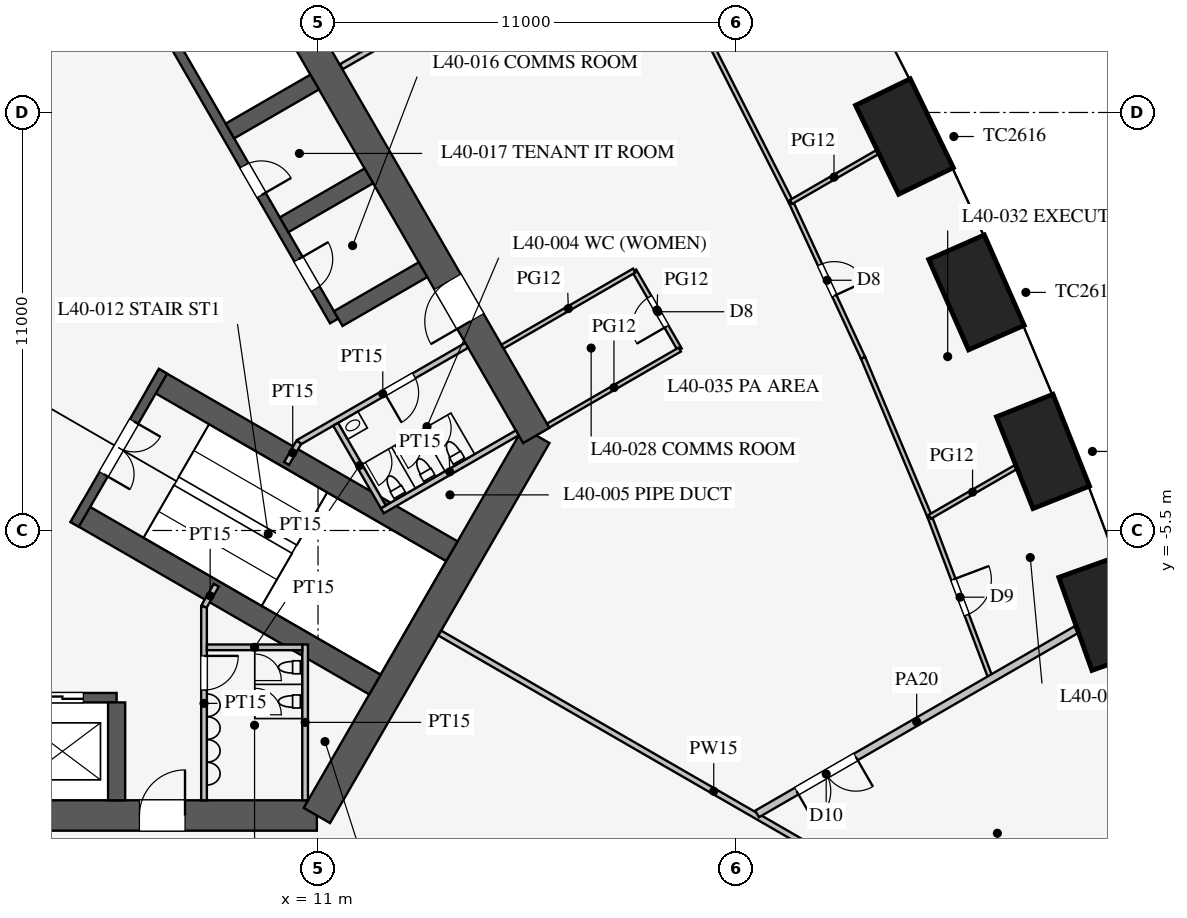
"""IFC4 building model, lengths in metres.
Left out: names, types, materials, properties, quantities, classifications, styles, units other than length and angle.
Written with IfcOpenShell. Run it as: python <this file> out.ifc"""

import sys

from ifc_helpers import new_model, si_unit, direction, frame, frame_2d, origin, origin_2d, place, context, subcontext, project, spatial, rectangle, extrude, element, fill, save


model = new_model("IFC4")
c1 = context("Model", 3, precision=1e-05, world=origin(), true_north=direction((0.0, 1.0)))
c2 = subcontext(c1, "Body", "Model", "MODEL_VIEW")
j1 = project(units=[si_unit("LENGTHUNIT", "METRE"), si_unit("PLANEANGLEUNIT", "RADIAN")], contexts=[c1])
p1 = place(None, origin())
s1 = spatial("IfcSite", under=j1, at=p1, CompositionType="ELEMENT")
p2 = place(p1, origin())
s2 = spatial("IfcBuilding", under=s1, at=p2, CompositionType="ELEMENT")
p3 = place(p2, frame((0.0, 0.0, 174.5)))
s3 = spatial("IfcBuildingStorey", under=s2, at=p3, CompositionType="ELEMENT", Elevation=174.5)
for number, where, z_axis, x_axis in (
    (1, (31.682, -7.689, 0.0), (0.0, 0.0, 1.0), (-0.336, 0.942, 0.0)),
    (2, (30.077, -3.42, 0.0), (0.0, 0.0, 1.0), (-0.37, 0.929, 0.0)),
    (3, (28.325, 0.765, 0.0), (0.0, 0.0, 1.0), (-0.403, 0.915, 0.0)),
    (4, (26.43, 4.867, 0.0), (0.0, 0.0, 1.0), (-0.436, 0.9, 0.0)),
):
    element("IfcColumn", number, at=place(p3, frame(where, z_axis=z_axis, x_axis=x_axis)), inside=s3, PredefinedType="COLUMN", context=c2, shape_type="SweptSolid", body=[
        extrude(rectangle(XDim=2.6, YDim=1.6, at=origin_2d()), origin(), (0.0, 0.0, 1.0), 4.2),
    ])
p4 = place(p3, frame((-10.97, -13.0, 0.0), z_axis=(0.0, 0.0, 1.0), x_axis=(1.0, 0.0, 0.0)))
e5 = element("IfcWall", 5, at=p4, inside=s3, PredefinedType="SHEAR", context=c2, shape_type="SweptSolid", body=[
    extrude(rectangle(XDim=21.939, YDim=0.8, at=frame_2d((10.97, 0.0))), origin(), (0.0, 0.0, 1.0), 4.2),
])
p5 = place(p4, frame((17.27, 0.0, 0.0)))
e6 = element("IfcOpeningElement", 6, at=p5, cuts=e5, PredefinedType="OPENING", context=c2, shape_type="SweptSolid", body=[
    extrude(rectangle(XDim=1.2, YDim=2.1, at=frame_2d((0.6, 1.05))), frame((0.0, 0.41, 0.0), z_axis=(0.0, -1.0, 0.0), x_axis=(1.0, 0.0, 0.0)), (0.0, 0.0, 1.0), 0.82),
])
p6 = place(p4, frame((3.47, 0.0, 0.0)))
e7 = element("IfcOpeningElement", 7, at=p6, cuts=e5, PredefinedType="OPENING", context=c2, shape_type="SweptSolid", body=[
    extrude(rectangle(XDim=1.2, YDim=2.1, at=frame_2d((0.6, 1.05))), frame((0.0, 0.41, 0.0), z_axis=(0.0, -1.0, 0.0), x_axis=(1.0, 0.0, 0.0)), (0.0, 0.0, 1.0), 0.82),
])
p7 = place(p3, frame((10.97, -13.0, 0.0), z_axis=(0.0, 0.0, 1.0), x_axis=(0.499995765644, 0.866027848477, 0.0)))
e8 = element("IfcWall", 8, at=p7, inside=s3, PredefinedType="SHEAR", context=c2, shape_type="SweptSolid", body=[
    extrude(rectangle(XDim=11.547, YDim=0.8, at=frame_2d((5.773, 0.0))), origin(), (0.0, 0.0, 1.0), 4.2),
])
p8 = place(p3, frame((16.743, -3.0, 0.0), z_axis=(0.0, 0.0, 1.0), x_axis=(-0.500002442456, 0.866023993627, 0.0)))
e9 = element("IfcWall", 9, at=p8, inside=s3, PredefinedType="SHEAR", context=c2, shape_type="SweptSolid", body=[
    extrude(rectangle(XDim=21.939, YDim=0.8, at=frame_2d((10.97, 0.0))), origin(), (0.0, 0.0, 1.0), 4.2),
])
p9 = place(p8, frame((17.27, 0.0, 0.0)))
e10 = element("IfcOpeningElement", 10, at=p9, cuts=e9, PredefinedType="OPENING", context=c2, shape_type="SweptSolid", body=[
    extrude(rectangle(XDim=1.2, YDim=2.1, at=frame_2d((0.6, 1.05))), frame((0.0, 0.41, 0.0), z_axis=(0.0, -1.0, 0.0), x_axis=(1.0, 0.0, 0.0)), (0.0, 0.0, 1.0), 0.82),
])
p10 = place(p8, frame((3.47, 0.0, 0.0)))
e11 = element("IfcOpeningElement", 11, at=p10, cuts=e9, PredefinedType="OPENING", context=c2, shape_type="SweptSolid", body=[
    extrude(rectangle(XDim=1.2, YDim=2.1, at=frame_2d((0.6, 1.05))), frame((0.0, 0.41, 0.0), z_axis=(0.0, -1.0, 0.0), x_axis=(1.0, 0.0, 0.0)), (0.0, 0.0, 1.0), 0.82),
])
p11 = place(p3, frame((-5.7, -9.9, 0.0), z_axis=(0.0, 0.0, 1.0), x_axis=(1.0, 0.0, 0.0)))
e12 = element("IfcWall", 12, at=p11, inside=s3, PredefinedType="SHEAR", context=c2, shape_type="SweptSolid", body=[
    extrude(rectangle(XDim=11.4, YDim=0.25, at=frame_2d((5.7, 0.0))), origin(), (0.0, 0.0, 1.0), 4.2),
])
p12 = place(p11, frame((0.875, 0.0, 0.0)))
e13 = element("IfcOpeningElement", 13, at=p12, cuts=e12, PredefinedType="OPENING", context=c2, shape_type="SweptSolid", body=[
    extrude(rectangle(XDim=1.1, YDim=2.2, at=frame_2d((0.55, 1.1))), frame((0.0, 0.135, 0.0), z_axis=(0.0, -1.0, 0.0), x_axis=(1.0, 0.0, 0.0)), (0.0, 0.0, 1.0), 0.27),
])
p13 = place(p11, frame((3.725, 0.0, 0.0)))
e14 = element("IfcOpeningElement", 14, at=p13, cuts=e12, PredefinedType="OPENING", context=c2, shape_type="SweptSolid", body=[
    extrude(rectangle(XDim=1.1, YDim=2.2, at=frame_2d((0.55, 1.1))), frame((0.0, 0.135, 0.0), z_axis=(0.0, -1.0, 0.0), x_axis=(1.0, 0.0, 0.0)), (0.0, 0.0, 1.0), 0.27),
])
p14 = place(p11, frame((6.575, 0.0, 0.0)))
e15 = element("IfcOpeningElement", 15, at=p14, cuts=e12, PredefinedType="OPENING", context=c2, shape_type="SweptSolid", body=[
    extrude(rectangle(XDim=1.1, YDim=2.2, at=frame_2d((0.55, 1.1))), frame((0.0, 0.135, 0.0), z_axis=(0.0, -1.0, 0.0), x_axis=(1.0, 0.0, 0.0)), (0.0, 0.0, 1.0), 0.27),
])
p15 = place(p11, frame((9.425, 0.0, 0.0)))
e16 = element("IfcOpeningElement", 16, at=p15, cuts=e12, PredefinedType="OPENING", context=c2, shape_type="SweptSolid", body=[
    extrude(rectangle(XDim=1.1, YDim=2.2, at=frame_2d((0.55, 1.1))), frame((0.0, 0.135, 0.0), z_axis=(0.0, -1.0, 0.0), x_axis=(1.0, 0.0, 0.0)), (0.0, 0.0, 1.0), 0.27),
])
p16 = place(p3, frame((5.7, -10.025, 0.0), z_axis=(0.0, 0.0, 1.0), x_axis=(0.0, -1.0, 0.0)))
e17 = element("IfcWall", 17, at=p16, inside=s3, PredefinedType="SHEAR", context=c2, shape_type="SweptSolid", body=[
    extrude(rectangle(XDim=2.575, YDim=0.45, at=frame_2d((1.288, 0.0))), origin(), (0.0, 0.0, 1.0), 4.2),
])
p17 = place(p3, frame((11.424, 0.014, 0.0), z_axis=(0.0, 0.0, 1.0), x_axis=(-0.500001763848, 0.866024385424, 0.0)))
e18 = element("IfcWall", 18, at=p17, inside=s3, PredefinedType="SHEAR", context=c2, shape_type="SweptSolid", body=[
    extrude(rectangle(XDim=11.4, YDim=0.25, at=frame_2d((5.7, 0.0))), origin(), (0.0, 0.0, 1.0), 4.2),
])
p18 = place(p17, frame((0.975, 0.0, 0.0)))
e19 = element("IfcOpeningElement", 19, at=p18, cuts=e18, PredefinedType="OPENING", context=c2, shape_type="SweptSolid", body=[
    extrude(rectangle(XDim=0.9, YDim=2.1, at=frame_2d((0.45, 1.05))), frame((0.0, 0.135, 0.0), z_axis=(0.0, -1.0, 0.0), x_axis=(1.0, 0.0, 0.0)), (0.0, 0.0, 1.0), 0.27),
])
p19 = place(p17, frame((3.825, 0.0, 0.0)))
e20 = element("IfcOpeningElement", 20, at=p19, cuts=e18, PredefinedType="OPENING", context=c2, shape_type="SweptSolid", body=[
    extrude(rectangle(XDim=0.9, YDim=2.1, at=frame_2d((0.45, 1.05))), frame((0.0, 0.135, 0.0), z_axis=(0.0, -1.0, 0.0), x_axis=(1.0, 0.0, 0.0)), (0.0, 0.0, 1.0), 0.27),
])
for number, where, z_axis, x_axis in (
    (21, (11.532, 0.076, 0.0), (0.0, 0.0, 1.0), (0.866, 0.5, 0.0)),
    (22, (10.107, 2.544, 0.0), (0.0, 0.0, 1.0), (0.866, 0.5, 0.0)),
    (23, (8.682, 5.012, 0.0), (0.0, 0.0, 1.0), (0.866, 0.5, 0.0)),
):
    element("IfcWall", number, at=place(p3, frame(where, z_axis=z_axis, x_axis=x_axis)), inside=s3, PredefinedType="SHEAR", context=c2, shape_type="SweptSolid", body=[
        extrude(rectangle(XDim=2.575, YDim=0.45, at=frame_2d((1.288, 0.0))), origin(), (0.0, 0.0, 1.0), 4.2),
    ])
for number, where, z_axis, x_axis in (
    (24, (4.638, -5.016, 0.0), (0.0, 0.0, 1.0), (0.866, -0.5, 0.0)),
    (25, (6.663, -1.509, 0.0), (0.0, 0.0, 1.0), (0.866, -0.5, 0.0)),
):
    element("IfcWall", number, at=place(p3, frame(where, z_axis=z_axis, x_axis=x_axis)), inside=s3, PredefinedType="SHEAR", context=c2, shape_type="SweptSolid", body=[
        extrude(rectangle(XDim=9.075, YDim=0.6, at=frame_2d((4.538, 0.0))), origin(), (0.0, 0.0, 1.0), 4.2),
    ])
p20 = place(p3, frame((4.597, -5.339, 0.0), z_axis=(0.0, 0.0, 1.0), x_axis=(0.499984536904, 0.866034331223, 0.0)))
e26 = element("IfcWall", 26, at=p20, inside=s3, PredefinedType="SHEAR", context=c2, shape_type="SweptSolid", body=[
    extrude(rectangle(XDim=4.65, YDim=0.25, at=frame_2d((2.325, 0.0))), origin(), (0.0, 0.0, 1.0), 4.2),
])
p21 = place(p20, frame((1.525, 0.0, 0.0)))
e27 = element("IfcOpeningElement", 27, at=p21, cuts=e26, PredefinedType="OPENING", context=c2, shape_type="SweptSolid", body=[
    extrude(rectangle(XDim=1.6, YDim=2.1, at=frame_2d((0.8, 1.05))), frame((0.0, 0.135, 0.0), z_axis=(0.0, -1.0, 0.0), x_axis=(1.0, 0.0, 0.0)), (0.0, 0.0, 1.0), 0.27),
])
p22 = place(p3, frame((8.0, -7.5, 0.0), z_axis=(0.0, 0.0, 1.0), x_axis=(0.0, -1.0, 0.0)))
e28 = element("IfcWall", 28, at=p22, inside=s3, PredefinedType="PARTITIONING", context=c2, shape_type="SweptSolid", body=[
    extrude(rectangle(XDim=5.1, YDim=0.15, at=frame_2d((2.55, 0.0))), origin(), (0.0, 0.0, 1.0), 3.95),
])
p23 = place(p22, frame((1.3, 0.0, 0.0)))
e29 = element("IfcOpeningElement", 29, at=p23, cuts=e28, PredefinedType="OPENING", context=c2, shape_type="SweptSolid", body=[
    extrude(rectangle(XDim=0.9, YDim=2.1, at=frame_2d((0.45, 1.05))), frame((0.0, 0.085, 0.0), z_axis=(0.0, -1.0, 0.0), x_axis=(1.0, 0.0, 0.0)), (0.0, 0.0, 1.0), 0.17),
])
p24 = place(p3, frame((10.495, -3.178, 0.0), z_axis=(0.0, 0.0, 1.0), x_axis=(0.86602216432, 0.500005610874, 0.0)))
e30 = element("IfcWall", 30, at=p24, inside=s3, PredefinedType="PARTITIONING", context=c2, shape_type="SweptSolid", body=[
    extrude(rectangle(XDim=5.1, YDim=0.15, at=frame_2d((2.55, 0.0))), origin(), (0.0, 0.0, 1.0), 3.95),
])
p25 = place(p24, frame((2.6, 0.0, 0.0)))
e31 = element("IfcOpeningElement", 31, at=p25, cuts=e30, PredefinedType="OPENING", context=c2, shape_type="SweptSolid", body=[
    extrude(rectangle(XDim=0.9, YDim=2.1, at=frame_2d((0.45, 1.05))), frame((0.0, 0.085, 0.0), z_axis=(0.0, -1.0, 0.0), x_axis=(1.0, 0.0, 0.0)), (0.0, 0.0, 1.0), 0.17),
])
for number, where, z_axis, x_axis in (
    (32, (8.0, -7.5, 0.0), (0.0, 0.0, 1.0), (0.5, 0.866, 0.0)),
    (33, (10.495, -3.178, 0.0), (0.0, 0.0, 1.0), (-0.5, -0.866, 0.0)),
):
    element("IfcWall", number, at=place(p3, frame(where, z_axis=z_axis, x_axis=x_axis)), inside=s3, PredefinedType="PARTITIONING", context=c2, shape_type="SweptSolid", body=[
        extrude(rectangle(XDim=0.645, YDim=0.15, at=frame_2d((0.323, 0.0))), origin(), (0.0, 0.0, 1.0), 3.95),
    ])
p26 = place(p3, frame((10.66, -8.5, 0.0), z_axis=(0.0, 0.0, 1.0), x_axis=(0.0, -1.0, 0.0)))
e34 = element("IfcWall", 34, at=p26, inside=s3, PredefinedType="PARTITIONING", context=c2, shape_type="SweptSolid", body=[
    extrude(rectangle(XDim=4.1, YDim=0.15, at=frame_2d((2.05, 0.0))), origin(), (0.0, 0.0, 1.0), 3.95),
])
p27 = place(p3, frame((8.075, -8.575, 0.0), z_axis=(0.0, 0.0, 1.0), x_axis=(1.0, 0.0, 0.0)))
e35 = element("IfcWall", 35, at=p27, inside=s3, PredefinedType="PARTITIONING", context=c2, shape_type="SweptSolid", body=[
    extrude(rectangle(XDim=2.51, YDim=0.15, at=frame_2d((1.255, 0.0))), origin(), (0.0, 0.0, 1.0), 3.95),
])
p28 = place(p3, frame((12.691, -4.982, 0.0), z_axis=(0.0, 0.0, 1.0), x_axis=(0.8660249478, 0.500000789788, 0.0)))
e36 = element("IfcWall", 36, at=p28, inside=s3, PredefinedType="PARTITIONING", context=c2, shape_type="SweptSolid", body=[
    extrude(rectangle(XDim=4.1, YDim=0.15, at=frame_2d((2.05, 0.0))), origin(), (0.0, 0.0, 1.0), 3.95),
])
p29 = place(p3, frame((11.464, -2.706, 0.0), z_axis=(0.0, 0.0, 1.0), x_axis=(0.50001992892, -0.866013897511, 0.0)))
e37 = element("IfcWall", 37, at=p29, inside=s3, PredefinedType="PARTITIONING", context=c2, shape_type="SweptSolid", body=[
    extrude(rectangle(XDim=2.51, YDim=0.15, at=frame_2d((1.255, 0.0))), origin(), (0.0, 0.0, 1.0), 3.95),
])
p30 = place(p3, frame((14.203, -8.2, 0.0), z_axis=(0.0, 0.0, 1.0), x_axis=(0.866024668836, -0.500001272966, 0.0)))
e38 = element("IfcWall", 38, at=p30, inside=s3, PredefinedType="PARTITIONING", context=c2, shape_type="SweptSolid", body=[
    extrude(rectangle(XDim=16.65, YDim=0.15, at=frame_2d((8.325, 0.0))), origin(), (0.0, 0.0, 1.0), 1.95),
])
p31 = place(p3, frame((11.613, 6.705, 0.0), z_axis=(0.0, 0.0, 1.0), x_axis=(0.866026306654, 0.499998436182, 0.0)))
e39 = element("IfcWall", 39, at=p31, inside=s3, PredefinedType="PARTITIONING", context=c2, shape_type="SweptSolid", body=[
    extrude(rectangle(XDim=11.41, YDim=0.15, at=frame_2d((5.705, 0.0))), origin(), (0.0, 0.0, 1.0), 2.15),
])
p32 = place(p3, frame((20.519, -0.74, 0.0), z_axis=(0.0, 0.0, 1.0), x_axis=(-0.499957262057, 0.866050077142, 0.0)))
e40 = element("IfcWall", 40, at=p32, inside=s3, PredefinedType="PARTITIONING", context=c2, shape_type="SweptSolid", body=[
    extrude(rectangle(XDim=2.4, YDim=0.12, at=frame_2d((1.2, 0.0))), origin(), (0.0, 0.0, 1.0), 2.9),
])
p33 = place(p32, frame((0.7, 0.0, 0.15)))
e41 = element("IfcOpeningElement", 41, at=p33, cuts=e40, PredefinedType="OPENING", context=c2, shape_type="SweptSolid", body=[
    extrude(rectangle(XDim=0.9, YDim=2.1, at=frame_2d((0.45, 1.05))), frame((0.0, 0.07, 0.0), z_axis=(0.0, -1.0, 0.0), x_axis=(1.0, 0.0, 0.0)), (0.0, 0.0, 1.0), 0.14),
])
for number, where, z_axis, x_axis in (
    (42, (17.055, -2.74, 0.0), (0.0, 0.0, 1.0), (0.866, 0.5, 0.0)),
    (43, (15.855, -0.661, 0.0), (0.0, 0.0, 1.0), (0.866, 0.5, 0.0)),
):
    element("IfcWall", number, at=place(p3, frame(where, z_axis=z_axis, x_axis=x_axis)), inside=s3, PredefinedType="PARTITIONING", context=c2, shape_type="SweptSolid", body=[
        extrude(rectangle(XDim=4.0, YDim=0.12, at=frame_2d((2.0, 0.0))), origin(), (0.0, 0.0, 1.0), 2.9),
    ])
p34 = place(p3, frame((25.342, -0.958, 0.0), z_axis=(0.0, 0.0, 1.0), x_axis=(-0.419883773418, 0.907577884713, 0.0)))
e44 = element("IfcWall", 44, at=p34, inside=s3, PredefinedType="PARTITIONING", context=c2, shape_type="SweptSolid", body=[
    extrude(rectangle(XDim=4.519, YDim=0.12, at=frame_2d((2.259, 0.0))), origin(), (0.0, 0.0, 1.0), 2.9),
])
p35 = place(p34, frame((1.8, 0.0, 0.15)))
e45 = element("IfcOpeningElement", 45, at=p35, cuts=e44, PredefinedType="OPENING", context=c2, shape_type="SweptSolid", body=[
    extrude(rectangle(XDim=0.9, YDim=2.1, at=frame_2d((0.45, 1.05))), frame((0.0, 0.07, 0.0), z_axis=(0.0, -1.0, 0.0), x_axis=(1.0, 0.0, 0.0)), (0.0, 0.0, 1.0), 0.14),
])
p36 = place(p3, frame((27.096, -5.141, 0.0), z_axis=(0.0, 0.0, 1.0), x_axis=(-0.386807881778, 0.922160323693, 0.0)))
e46 = element("IfcWall", 46, at=p36, inside=s3, PredefinedType="PARTITIONING", context=c2, shape_type="SweptSolid", body=[
    extrude(rectangle(XDim=4.536, YDim=0.12, at=frame_2d((2.268, 0.0))), origin(), (0.0, 0.0, 1.0), 2.9),
])
p37 = place(p3, frame((28.706, -9.408, 0.0), z_axis=(0.0, 0.0, 1.0), x_axis=(-0.352894560512, 0.93566309597, 0.0)))
e47 = element("IfcWall", 47, at=p37, inside=s3, PredefinedType="PARTITIONING", context=c2, shape_type="SweptSolid", body=[
    extrude(rectangle(XDim=4.561, YDim=0.12, at=frame_2d((2.28, 0.0))), origin(), (0.0, 0.0, 1.0), 2.9),
])
p38 = place(p37, frame((1.8, 0.0, 0.15)))
e48 = element("IfcOpeningElement", 48, at=p38, cuts=e47, PredefinedType="OPENING", context=c2, shape_type="SweptSolid", body=[
    extrude(rectangle(XDim=1.0, YDim=2.1, at=frame_2d((0.5, 1.05))), frame((0.0, 0.07, 0.0), z_axis=(0.0, -1.0, 0.0), x_axis=(1.0, 0.0, 0.0)), (0.0, 0.0, 1.0), 0.14),
])
p39 = place(p3, frame((23.444, 3.143, 0.0), z_axis=(0.0, 0.0, 1.0), x_axis=(-0.452471679136, 0.891778772779, 0.0)))
e49 = element("IfcWall", 49, at=p39, inside=s3, PredefinedType="PARTITIONING", context=c2, shape_type="SweptSolid", body=[
    extrude(rectangle(XDim=4.507, YDim=0.12, at=frame_2d((2.253, 0.0))), origin(), (0.0, 0.0, 1.0), 2.9),
])
p40 = place(p3, frame((27.096, -5.141, 0.0), z_axis=(0.0, 0.0, 1.0), x_axis=(0.866012205188, 0.500022859943, 0.0)))
e50 = element("IfcWall", 50, at=p40, inside=s3, PredefinedType="PARTITIONING", context=c2, shape_type="SweptSolid", body=[
    extrude(rectangle(XDim=2.603, YDim=0.12, at=frame_2d((1.302, 0.0))), origin(), (0.0, 0.0, 1.0), 2.15),
])
p41 = place(p3, frame((22.553, -12.96, 0.0), z_axis=(0.0, 0.0, 1.0), x_axis=(0.866028367999, 0.499994865794, 0.0)))
e51 = element("IfcWall", 51, at=p41, inside=s3, PredefinedType="PARTITIONING", context=c2, shape_type="SweptSolid", body=[
    extrude(rectangle(XDim=9.697, YDim=0.2, at=frame_2d((4.849, 0.0))), origin(), (0.0, 0.0, 1.0), 2.35),
])
p42 = place(p41, frame((1.2, 0.0, 0.15)))
e52 = element("IfcOpeningElement", 52, at=p42, cuts=e51, PredefinedType="OPENING", context=c2, shape_type="SweptSolid", body=[
    extrude(rectangle(XDim=1.8, YDim=2.1, at=frame_2d((0.9, 1.05))), frame((0.0, 0.11, 0.0), z_axis=(0.0, -1.0, 0.0), x_axis=(1.0, 0.0, 0.0)), (0.0, 0.0, 1.0), 0.22),
])
p43 = place(p3, frame((23.444, 3.143, 0.0), z_axis=(0.0, 0.0, 1.0), x_axis=(0.866011491631, 0.500024095782, 0.0)))
e53 = element("IfcWall", 53, at=p43, inside=s3, PredefinedType="PARTITIONING", context=c2, shape_type="SweptSolid", body=[
    extrude(rectangle(XDim=2.615, YDim=0.12, at=frame_2d((1.308, 0.0))), origin(), (0.0, 0.0, 1.0), 2.35),
])
p44 = place(p23, origin())
e54 = element("IfcDoor", 54, at=p44, inside=s3, OperationType="SINGLE_SWING_LEFT", PredefinedType="DOOR", context=c2, shape_type="SweptSolid", body=[
    extrude(rectangle(XDim=0.9, YDim=2.1, at=frame_2d((0.45, 1.05))), frame((0.0, 0.025, 0.0), z_axis=(0.0, -1.0, 0.0), x_axis=(1.0, 0.0, 0.0)), (0.0, 0.0, 1.0), 0.05),
])
fill(e29, e54)
p45 = place(p25, frame((0.9, 0.0, 0.0), z_axis=(0.0, 0.0, 1.0), x_axis=(-1.0, 0.0, 0.0)))
e55 = element("IfcDoor", 55, at=p45, inside=s3, OperationType="SINGLE_SWING_RIGHT", PredefinedType="DOOR", context=c2, shape_type="SweptSolid", body=[
    extrude(rectangle(XDim=0.9, YDim=2.1, at=frame_2d((0.45, 1.05))), frame((0.0, 0.025, 0.0), z_axis=(0.0, -1.0, 0.0), x_axis=(1.0, 0.0, 0.0)), (0.0, 0.0, 1.0), 0.05),
])
fill(e31, e55)
p46 = place(p21, frame((1.6, 0.0, 0.0), z_axis=(0.0, 0.0, 1.0), x_axis=(-1.0, 0.0, 0.0)))
e56 = element("IfcDoor", 56, at=p46, inside=s3, OperationType="DOUBLE_DOOR_SINGLE_SWING", PredefinedType="DOOR", context=c2, shape_type="SweptSolid", body=[
    extrude(rectangle(XDim=1.6, YDim=2.1, at=frame_2d((0.8, 1.05))), frame((0.0, 0.025, 0.0), z_axis=(0.0, -1.0, 0.0), x_axis=(1.0, 0.0, 0.0)), (0.0, 0.0, 1.0), 0.05),
])
fill(e27, e56)
p47 = place(p5, origin())
e57 = element("IfcDoor", 57, at=p47, inside=s3, OperationType="SINGLE_SWING_RIGHT", PredefinedType="DOOR", context=c2, shape_type="SweptSolid", body=[
    extrude(rectangle(XDim=1.2, YDim=2.1, at=frame_2d((0.6, 1.05))), frame((0.0, 0.025, 0.0), z_axis=(0.0, -1.0, 0.0), x_axis=(1.0, 0.0, 0.0)), (0.0, 0.0, 1.0), 0.05),
])
fill(e6, e57)
p48 = place(p10, origin())
e58 = element("IfcDoor", 58, at=p48, inside=s3, OperationType="SINGLE_SWING_LEFT", PredefinedType="DOOR", context=c2, shape_type="SweptSolid", body=[
    extrude(rectangle(XDim=1.2, YDim=2.1, at=frame_2d((0.6, 1.05))), frame((0.0, 0.025, 0.0), z_axis=(0.0, -1.0, 0.0), x_axis=(1.0, 0.0, 0.0)), (0.0, 0.0, 1.0), 0.05),
])
fill(e11, e58)
p49 = place(p18, frame((0.9, 0.0, 0.0), z_axis=(0.0, 0.0, 1.0), x_axis=(-1.0, 0.0, 0.0)))
e59 = element("IfcDoor", 59, at=p49, inside=s3, OperationType="SINGLE_SWING_LEFT", PredefinedType="DOOR", context=c2, shape_type="SweptSolid", body=[
    extrude(rectangle(XDim=0.9, YDim=2.1, at=frame_2d((0.45, 1.05))), frame((0.0, 0.025, 0.0), z_axis=(0.0, -1.0, 0.0), x_axis=(1.0, 0.0, 0.0)), (0.0, 0.0, 1.0), 0.05),
])
fill(e19, e59)
p50 = place(p19, frame((0.9, 0.0, 0.0), z_axis=(0.0, 0.0, 1.0), x_axis=(-1.0, 0.0, 0.0)))
e60 = element("IfcDoor", 60, at=p50, inside=s3, OperationType="SINGLE_SWING_RIGHT", PredefinedType="DOOR", context=c2, shape_type="SweptSolid", body=[
    extrude(rectangle(XDim=0.9, YDim=2.1, at=frame_2d((0.45, 1.05))), frame((0.0, 0.025, 0.0), z_axis=(0.0, -1.0, 0.0), x_axis=(1.0, 0.0, 0.0)), (0.0, 0.0, 1.0), 0.05),
])
fill(e20, e60)
p51 = place(p42, frame((1.8, 0.0, 0.0), z_axis=(0.0, 0.0, 1.0), x_axis=(-1.0, 0.0, 0.0)))
e61 = element("IfcDoor", 61, at=p51, inside=s3, OperationType="DOUBLE_DOOR_SINGLE_SWING", PredefinedType="DOOR", context=c2, shape_type="SweptSolid", body=[
    extrude(rectangle(XDim=1.8, YDim=2.1, at=frame_2d((0.9, 1.05))), frame((0.0, 0.025, 0.0), z_axis=(0.0, -1.0, 0.0), x_axis=(1.0, 0.0, 0.0)), (0.0, 0.0, 1.0), 0.05),
])
fill(e52, e61)
p52 = place(p33, origin())
e62 = element("IfcDoor", 62, at=p52, inside=s3, OperationType="SINGLE_SWING_LEFT", PredefinedType="DOOR", context=c2, shape_type="SweptSolid", body=[
    extrude(rectangle(XDim=0.9, YDim=2.1, at=frame_2d((0.45, 1.05))), frame((0.0, 0.025, 0.0), z_axis=(0.0, -1.0, 0.0), x_axis=(1.0, 0.0, 0.0)), (0.0, 0.0, 1.0), 0.05),
])
fill(e41, e62)
p53 = place(p35, frame((0.9, 0.0, 0.0), z_axis=(0.0, 0.0, 1.0), x_axis=(-1.0, 0.0, 0.0)))
e63 = element("IfcDoor", 63, at=p53, inside=s3, OperationType="SINGLE_SWING_RIGHT", PredefinedType="DOOR", context=c2, shape_type="SweptSolid", body=[
    extrude(rectangle(XDim=0.9, YDim=2.1, at=frame_2d((0.45, 1.05))), frame((0.0, 0.025, 0.0), z_axis=(0.0, -1.0, 0.0), x_axis=(1.0, 0.0, 0.0)), (0.0, 0.0, 1.0), 0.05),
])
fill(e45, e63)
p54 = place(p38, frame((1.0, 0.0, 0.0), z_axis=(0.0, 0.0, 1.0), x_axis=(-1.0, 0.0, 0.0)))
e64 = element("IfcDoor", 64, at=p54, inside=s3, OperationType="SINGLE_SWING_LEFT", PredefinedType="DOOR", context=c2, shape_type="SweptSolid", body=[
    extrude(rectangle(XDim=1.0, YDim=2.1, at=frame_2d((0.5, 1.05))), frame((0.0, 0.025, 0.0), z_axis=(0.0, -1.0, 0.0), x_axis=(1.0, 0.0, 0.0)), (0.0, 0.0, 1.0), 0.05),
])
fill(e48, e64)
p55 = place(p15, origin())
e65 = element("IfcDoor", 65, at=p55, inside=s3, OperationType="DOUBLE_DOOR_SLIDING", PredefinedType="DOOR", context=c2, shape_type="SweptSolid", body=[
    extrude(rectangle(XDim=1.1, YDim=2.2, at=frame_2d((0.55, 1.1))), frame((0.0, 0.025, 0.0), z_axis=(0.0, -1.0, 0.0), x_axis=(1.0, 0.0, 0.0)), (0.0, 0.0, 1.0), 0.05),
])
fill(e16, e65)
save(model, sys.argv[1])
